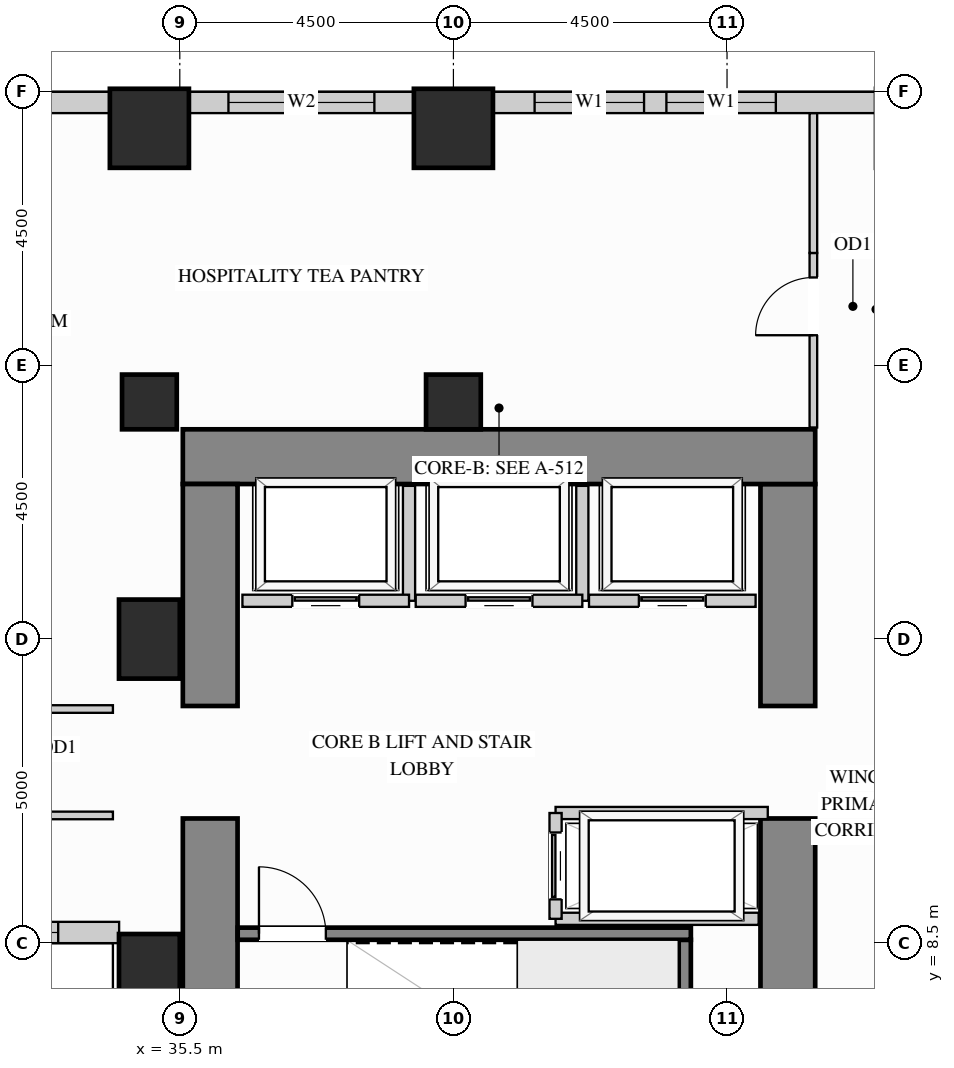
"""IFC4 building model, lengths in metres.
Left out: names, types, materials, properties, quantities, classifications, styles, units other than length and angle.
Written with IfcOpenShell. Run it as: python <this file> out.ifc"""

import sys

from ifc_helpers import new_model, si_unit, direction, frame, frame_2d, origin, origin_2d, place, context, subcontext, project, spatial, rectangle, extrude, source, transform, mapped, element, fill, save


model = new_model("IFC4")
c1 = context("Model", 3, precision=1e-05, world=origin(), true_north=direction((0.0, 1.0)))
c2 = subcontext(c1, "Body", "Model", "MODEL_VIEW")
j1 = project(units=[si_unit("LENGTHUNIT", "METRE"), si_unit("PLANEANGLEUNIT", "RADIAN")], contexts=[c1])
p1 = place(None, origin())
s1 = spatial("IfcSite", under=j1, at=p1, CompositionType="ELEMENT")
p2 = place(p1, origin())
s2 = spatial("IfcBuilding", under=s1, at=p2, CompositionType="ELEMENT")
p3 = place(p2, frame((0.0, 0.0, 62.1)))
s3 = spatial("IfcBuildingStorey", under=s2, at=p3, CompositionType="ELEMENT", Elevation=62.1)
m1 = source(origin(), c2, "Body", "SweptSolid", [
    extrude(rectangle(XDim=0.9, YDim=0.9, at=origin_2d()), origin(), (0.0, 0.0, 1.0), 3.38),
])
for number, where, z_axis, x_axis in (
    (1, (35.0, 17.4, 0.0), (0.0, 0.0, 1.0), (1.0, 0.0, 0.0)),
    (2, (40.0, 17.4, 0.0), (0.0, 0.0, 1.0), (1.0, 0.0, 0.0)),
):
    element("IfcColumn", number, at=place(p3, frame(where, z_axis=z_axis, x_axis=x_axis)), inside=s3, PredefinedType="COLUMN", context=c2, shape_type="MappedRepresentation", body=[
        mapped(m1, transform((0.0, 0.0, 0.0), x_axis=(1.0, 0.0, 0.0), y_axis=(0.0, 1.0, 0.0), z_axis=(0.0, 0.0, 1.0))),
    ])
m2 = source(origin(), c2, "Body", "SweptSolid", [
    extrude(rectangle(XDim=1.0, YDim=1.3, at=origin_2d()), origin(), (0.0, 0.0, 1.0), 3.38),
])
for number, where, z_axis, x_axis in (
    (3, (35.0, 13.5, 0.0), (0.0, 0.0, 1.0), (1.0, 0.0, 0.0)),
    (4, (35.0, 8.0, 0.0), (0.0, 0.0, 1.0), (1.0, 0.0, 0.0)),
):
    element("IfcColumn", number, at=place(p3, frame(where, z_axis=z_axis, x_axis=x_axis)), inside=s3, PredefinedType="COLUMN", context=c2, shape_type="MappedRepresentation", body=[
        mapped(m2, transform((0.0, 0.0, 0.0), x_axis=(1.0, 0.0, 0.0), y_axis=(0.0, 1.0, 0.0), z_axis=(0.0, 0.0, 1.0))),
    ])
m3 = source(origin(), c2, "Body", "SweptSolid", [
    extrude(rectangle(XDim=1.3, YDim=1.3, at=origin_2d()), origin(), (0.0, 0.0, 1.0), 3.38),
])
for number, where, z_axis, x_axis in (
    (5, (35.0, 21.9, 0.0), (0.0, 0.0, 1.0), (1.0, 0.0, 0.0)),
    (6, (40.0, 21.9, 0.0), (0.0, 0.0, 1.0), (1.0, 0.0, 0.0)),
):
    element("IfcColumn", number, at=place(p3, frame(where, z_axis=z_axis, x_axis=x_axis)), inside=s3, PredefinedType="COLUMN", context=c2, shape_type="MappedRepresentation", body=[
        mapped(m3, transform((0.0, 0.0, 0.0), x_axis=(1.0, 0.0, 0.0), y_axis=(0.0, 1.0, 0.0), z_axis=(0.0, 0.0, 1.0))),
    ])
m4 = source(origin(), c2, "Body", "SweptSolid", [
    extrude(rectangle(XDim=5.6, YDim=0.9, at=frame_2d((2.8, 0.0))), origin(), (0.0, 0.0, 1.0), 3.38),
])
p4 = place(p3, frame((45.5, 4.95, 0.0), z_axis=(0.0, 0.0, 1.0), x_axis=(0.0, 1.0, 0.0)))
e7 = element("IfcWall", 7, at=p4, inside=s3, PredefinedType="SHEAR", context=c2, shape_type="MappedRepresentation", body=[
    mapped(m4, transform((0.0, 0.0, 0.0), x_axis=(1.0, 0.0, 0.0), y_axis=(0.0, 1.0, 0.0), z_axis=(0.0, 0.0, 1.0))),
])
m5 = source(origin(), c2, "Body", "SweptSolid", [
    extrude(rectangle(XDim=3.65, YDim=0.9, at=frame_2d((1.825, 0.0))), origin(), (0.0, 0.0, 1.0), 3.38),
])
p5 = place(p3, frame((45.5, 12.4, 0.0), z_axis=(0.0, 0.0, 1.0), x_axis=(0.0, 1.0, 0.0)))
e8 = element("IfcWall", 8, at=p5, inside=s3, PredefinedType="SHEAR", context=c2, shape_type="MappedRepresentation", body=[
    mapped(m5, transform((0.0, 0.0, 0.0), x_axis=(1.0, 0.0, 0.0), y_axis=(0.0, 1.0, 0.0), z_axis=(0.0, 0.0, 1.0))),
])
m6 = source(origin(), c2, "Body", "SweptSolid", [
    extrude(rectangle(XDim=10.4, YDim=0.9, at=frame_2d((5.2, 0.0))), origin(), (0.0, 0.0, 1.0), 3.38),
])
p6 = place(p3, frame((35.55, 16.5, 0.0), z_axis=(0.0, 0.0, 1.0), x_axis=(1.0, 0.0, 0.0)))
e9 = element("IfcWall", 9, at=p6, inside=s3, PredefinedType="SHEAR", context=c2, shape_type="MappedRepresentation", body=[
    mapped(m6, transform((0.0, 0.0, 0.0), x_axis=(1.0, 0.0, 0.0), y_axis=(0.0, 1.0, 0.0), z_axis=(0.0, 0.0, 1.0))),
])
p7 = place(p3, frame((36.0, 4.95, 0.0), z_axis=(0.0, 0.0, 1.0), x_axis=(0.0, 1.0, 0.0)))
e10 = element("IfcWall", 10, at=p7, inside=s3, PredefinedType="SHEAR", context=c2, shape_type="MappedRepresentation", body=[
    mapped(m4, transform((0.0, 0.0, 0.0), x_axis=(1.0, 0.0, 0.0), y_axis=(0.0, 1.0, 0.0), z_axis=(0.0, 0.0, 1.0))),
])
p8 = place(p3, frame((36.0, 12.4, 0.0), z_axis=(0.0, 0.0, 1.0), x_axis=(0.0, 1.0, 0.0)))
e11 = element("IfcWall", 11, at=p8, inside=s3, PredefinedType="SHEAR", context=c2, shape_type="MappedRepresentation", body=[
    mapped(m5, transform((0.0, 0.0, 0.0), x_axis=(1.0, 0.0, 0.0), y_axis=(0.0, 1.0, 0.0), z_axis=(0.0, 0.0, 1.0))),
])
p9 = place(p3, frame((30.998, 8.675, 0.0), z_axis=(0.0, 0.0, 1.0), x_axis=(1.0, 0.0, 0.0)))
e12 = element("IfcWall", 12, at=p9, inside=s3, PredefinedType="SOLIDWALL", context=c2, shape_type="SweptSolid", body=[
    extrude(rectangle(XDim=3.504, YDim=0.35, at=frame_2d((1.752, 0.0))), origin(), (0.0, 0.0, 1.0), 3.365),
])
p10 = place(p9, frame((1.002, 0.0, 0.78)))
e13 = element("IfcOpeningElement", 13, at=p10, cuts=e12, PredefinedType="OPENING", context=c2, shape_type="SweptSolid", body=[
    extrude(rectangle(XDim=1.5, YDim=2.0, at=frame_2d((0.75, 1.0))), frame((0.0, 0.185, 0.0), z_axis=(0.0, -1.0, 0.0), x_axis=(1.0, 0.0, 0.0)), (0.0, 0.0, 1.0), 0.37),
])
p11 = place(p3, frame((46.952, 22.325, 0.0), z_axis=(0.0, 0.0, 1.0), x_axis=(-1.0, 0.0, 0.0)))
e14 = element("IfcWall", 14, at=p11, inside=s3, PredefinedType="SOLIDWALL", context=c2, shape_type="SweptSolid", body=[
    extrude(rectangle(XDim=6.304, YDim=0.35, at=frame_2d((3.152, 0.0))), origin(), (0.0, 0.0, 1.0), 2.51),
])
p12 = place(p11, frame((1.649, 0.0, 0.78)))
e15 = element("IfcOpeningElement", 15, at=p12, cuts=e14, PredefinedType="OPENING", context=c2, shape_type="SweptSolid", body=[
    extrude(rectangle(XDim=1.8, YDim=1.55, at=frame_2d((0.9, 0.775))), frame((0.0, 0.185, 0.0), z_axis=(0.0, -1.0, 0.0), x_axis=(1.0, 0.0, 0.0)), (0.0, 0.0, 1.0), 0.37),
])
p13 = place(p11, frame((3.817, 0.0, 0.78)))
e16 = element("IfcOpeningElement", 16, at=p13, cuts=e14, PredefinedType="OPENING", context=c2, shape_type="SweptSolid", body=[
    extrude(rectangle(XDim=1.8, YDim=1.55, at=frame_2d((0.9, 0.775))), frame((0.0, 0.185, 0.0), z_axis=(0.0, -1.0, 0.0), x_axis=(1.0, 0.0, 0.0)), (0.0, 0.0, 1.0), 0.37),
])
p14 = place(p3, frame((39.352, 22.325, 0.0), z_axis=(0.0, 0.0, 1.0), x_axis=(-1.0, 0.0, 0.0)))
e17 = element("IfcWall", 17, at=p14, inside=s3, PredefinedType="SOLIDWALL", context=c2, shape_type="SweptSolid", body=[
    extrude(rectangle(XDim=3.704, YDim=0.35, at=frame_2d((1.852, 0.0))), origin(), (0.0, 0.0, 1.0), 2.51),
])
p15 = place(p14, frame((0.652, 0.0, 0.78)))
e18 = element("IfcOpeningElement", 18, at=p15, cuts=e17, PredefinedType="OPENING", context=c2, shape_type="SweptSolid", body=[
    extrude(rectangle(XDim=2.4, YDim=1.55, at=frame_2d((1.2, 0.775))), frame((0.0, 0.185, 0.0), z_axis=(0.0, -1.0, 0.0), x_axis=(1.0, 0.0, 0.0)), (0.0, 0.0, 1.0), 0.37),
])
p16 = place(p3, frame((34.352, 22.325, 0.0), z_axis=(0.0, 0.0, 1.0), x_axis=(-1.0, 0.0, 0.0)))
e19 = element("IfcWall", 19, at=p16, inside=s3, PredefinedType="SOLIDWALL", context=c2, shape_type="SweptSolid", body=[
    extrude(rectangle(XDim=14.854, YDim=0.35, at=frame_2d((7.427, 0.0))), origin(), (0.0, 0.0, 1.0), 3.365),
])
p17 = place(p16, frame((4.058, 0.0, 0.78)))
e20 = element("IfcOpeningElement", 20, at=p17, cuts=e19, PredefinedType="OPENING", context=c2, shape_type="SweptSolid", body=[
    extrude(rectangle(XDim=1.5, YDim=2.0, at=frame_2d((0.75, 1.0))), frame((0.0, 0.185, 0.0), z_axis=(0.0, -1.0, 0.0), x_axis=(1.0, 0.0, 0.0)), (0.0, 0.0, 1.0), 0.37),
])
p18 = place(p16, frame((9.296, 0.0, 0.78)))
e21 = element("IfcOpeningElement", 21, at=p18, cuts=e19, PredefinedType="OPENING", context=c2, shape_type="SweptSolid", body=[
    extrude(rectangle(XDim=1.5, YDim=2.0, at=frame_2d((0.75, 1.0))), frame((0.0, 0.185, 0.0), z_axis=(0.0, -1.0, 0.0), x_axis=(1.0, 0.0, 0.0)), (0.0, 0.0, 1.0), 0.37),
])
p19 = place(p3, frame((45.92, 16.98, 0.0), z_axis=(0.0, 0.0, 1.0), x_axis=(0.0, 1.0, 0.0)))
e22 = element("IfcWall", 22, at=p19, inside=s3, PredefinedType="PARTITIONING", context=c2, shape_type="SweptSolid", body=[
    extrude(rectangle(XDim=2.87, YDim=0.125, at=frame_2d((1.435, 0.0))), origin(), (0.0, 0.0, 1.0), 3.365),
])
p20 = place(p19, frame((1.517, 0.0, 0.0)))
e23 = element("IfcOpeningElement", 23, at=p20, cuts=e22, PredefinedType="OPENING", context=c2, shape_type="SweptSolid", body=[
    extrude(rectangle(XDim=0.95, YDim=2.15, at=frame_2d((0.475, 1.075))), frame((0.0, 0.073, 0.0), z_axis=(0.0, -1.0, 0.0), x_axis=(1.0, 0.0, 0.0)), (0.0, 0.0, 1.0), 0.145),
])
m7 = source(origin(), c2, "Body", "SweptSolid", [
    extrude(rectangle(XDim=2.298, YDim=0.125, at=frame_2d((1.149, 0.0))), origin(), (0.0, 0.0, 1.0), 3.365),
])
p21 = place(p3, frame((45.92, 19.85, 0.0), z_axis=(0.0, 0.0, 1.0), x_axis=(0.0, 1.0, 0.0)))
e24 = element("IfcWall", 24, at=p21, inside=s3, PredefinedType="PARTITIONING", context=c2, shape_type="MappedRepresentation", body=[
    mapped(m7, transform((0.0, 0.0, 0.0), x_axis=(1.0, 0.0, 0.0), y_axis=(0.0, 1.0, 0.0), z_axis=(0.0, 0.0, 1.0))),
])
p22 = place(p3, frame((29.85, 12.35, 0.0), z_axis=(0.0, 0.0, 1.0), x_axis=(1.0, 0.0, 0.0)))
e25 = element("IfcWall", 25, at=p22, inside=s3, PredefinedType="PARTITIONING", context=c2, shape_type="SweptSolid", body=[
    extrude(rectangle(XDim=4.55, YDim=0.125, at=frame_2d((2.275, 0.0))), origin(), (0.0, 0.0, 1.0), 3.365),
])
p23 = place(p22, frame((1.8, 0.0, 0.0)))
e26 = element("IfcOpeningElement", 26, at=p23, cuts=e25, PredefinedType="OPENING", context=c2, shape_type="SweptSolid", body=[
    extrude(rectangle(XDim=0.95, YDim=2.15, at=frame_2d((0.475, 1.075))), frame((0.0, 0.073, 0.0), z_axis=(0.0, -1.0, 0.0), x_axis=(1.0, 0.0, 0.0)), (0.0, 0.0, 1.0), 0.145),
])
p24 = place(p3, frame((26.95, 10.6, 0.0), z_axis=(0.0, 0.0, 1.0), x_axis=(1.0, 0.0, 0.0)))
e27 = element("IfcWall", 27, at=p24, inside=s3, PredefinedType="PARTITIONING", context=c2, shape_type="SweptSolid", body=[
    extrude(rectangle(XDim=7.45, YDim=0.125, at=frame_2d((3.725, 0.0))), origin(), (0.0, 0.0, 1.0), 3.365),
])
p25 = place(p24, frame((4.683, 0.0, 0.0)))
e28 = element("IfcOpeningElement", 28, at=p25, cuts=e27, PredefinedType="OPENING", context=c2, shape_type="SweptSolid", body=[
    extrude(rectangle(XDim=0.95, YDim=2.15, at=frame_2d((0.475, 1.075))), frame((0.0, 0.073, 0.0), z_axis=(0.0, -1.0, 0.0), x_axis=(1.0, 0.0, 0.0)), (0.0, 0.0, 1.0), 0.145),
])
m8 = source(origin(), c2, "Body", "SweptSolid", [
    extrude(rectangle(XDim=1.89, YDim=0.2, at=frame_2d((0.945, 0.0))), origin(), (0.0, 0.0, 1.0), 3.365),
])
p26 = place(p3, frame((39.27, 14.13, 0.0), z_axis=(0.0, 0.0, 1.0), x_axis=(0.0, 1.0, 0.0)))
e29 = element("IfcWall", 29, at=p26, inside=s3, PredefinedType="PARTITIONING", context=c2, shape_type="MappedRepresentation", body=[
    mapped(m8, transform((0.0, 0.0, 0.0), x_axis=(1.0, 0.0, 0.0), y_axis=(0.0, 1.0, 0.0), z_axis=(0.0, 0.0, 1.0))),
])
p27 = place(p3, frame((36.53, 14.13, 0.0), z_axis=(0.0, 0.0, 1.0), x_axis=(1.0, 0.0, 0.0)))
e30 = element("IfcWall", 30, at=p27, inside=s3, PredefinedType="PARTITIONING", context=c2, shape_type="SweptSolid", body=[
    extrude(rectangle(XDim=2.74, YDim=0.2, at=frame_2d((1.37, 0.0))), origin(), (0.0, 0.0, 1.0), 3.365),
])
p28 = place(p27, frame((0.82, 0.0, 0.0)))
e31 = element("IfcOpeningElement", 31, at=p28, cuts=e30, PredefinedType="OPENING", context=c2, shape_type="SweptSolid", body=[
    extrude(rectangle(XDim=1.1, YDim=2.2, at=frame_2d((0.55, 1.1))), frame((0.0, 0.11, 0.0), z_axis=(0.0, -1.0, 0.0), x_axis=(1.0, 0.0, 0.0)), (0.0, 0.0, 1.0), 0.22),
])
p29 = place(p3, frame((42.12, 14.13, 0.0), z_axis=(0.0, 0.0, 1.0), x_axis=(0.0, 1.0, 0.0)))
e32 = element("IfcWall", 32, at=p29, inside=s3, PredefinedType="PARTITIONING", context=c2, shape_type="MappedRepresentation", body=[
    mapped(m8, transform((0.0, 0.0, 0.0), x_axis=(1.0, 0.0, 0.0), y_axis=(0.0, 1.0, 0.0), z_axis=(0.0, 0.0, 1.0))),
])
p30 = place(p3, frame((39.38, 14.13, 0.0), z_axis=(0.0, 0.0, 1.0), x_axis=(1.0, 0.0, 0.0)))
e33 = element("IfcWall", 33, at=p30, inside=s3, PredefinedType="PARTITIONING", context=c2, shape_type="SweptSolid", body=[
    extrude(rectangle(XDim=2.74, YDim=0.2, at=frame_2d((1.37, 0.0))), origin(), (0.0, 0.0, 1.0), 3.365),
])
p31 = place(p30, frame((0.82, 0.0, 0.0)))
e34 = element("IfcOpeningElement", 34, at=p31, cuts=e33, PredefinedType="OPENING", context=c2, shape_type="SweptSolid", body=[
    extrude(rectangle(XDim=1.1, YDim=2.2, at=frame_2d((0.55, 1.1))), frame((0.0, 0.11, 0.0), z_axis=(0.0, -1.0, 0.0), x_axis=(1.0, 0.0, 0.0)), (0.0, 0.0, 1.0), 0.22),
])
p32 = place(p3, frame((42.23, 14.13, 0.0), z_axis=(0.0, 0.0, 1.0), x_axis=(1.0, 0.0, 0.0)))
e35 = element("IfcWall", 35, at=p32, inside=s3, PredefinedType="PARTITIONING", context=c2, shape_type="SweptSolid", body=[
    extrude(rectangle(XDim=2.74, YDim=0.2, at=frame_2d((1.37, 0.0))), origin(), (0.0, 0.0, 1.0), 3.365),
])
p33 = place(p32, frame((0.82, 0.0, 0.0)))
e36 = element("IfcOpeningElement", 36, at=p33, cuts=e35, PredefinedType="OPENING", context=c2, shape_type="SweptSolid", body=[
    extrude(rectangle(XDim=1.1, YDim=2.2, at=frame_2d((0.55, 1.1))), frame((0.0, 0.11, 0.0), z_axis=(0.0, -1.0, 0.0), x_axis=(1.0, 0.0, 0.0)), (0.0, 0.0, 1.0), 0.22),
])
m9 = source(origin(), c2, "Body", "SweptSolid", [
    extrude(rectangle(XDim=3.49, YDim=0.2, at=frame_2d((1.745, 0.0))), origin(), (0.0, 0.0, 1.0), 3.365),
])
p34 = place(p3, frame((41.68, 10.64, 0.0), z_axis=(0.0, 0.0, 1.0), x_axis=(1.0, 0.0, 0.0)))
e37 = element("IfcWall", 37, at=p34, inside=s3, PredefinedType="PARTITIONING", context=c2, shape_type="MappedRepresentation", body=[
    mapped(m9, transform((0.0, 0.0, 0.0), x_axis=(1.0, 0.0, 0.0), y_axis=(0.0, 1.0, 0.0), z_axis=(0.0, 0.0, 1.0))),
])
m10 = source(origin(), c2, "Body", "SweptSolid", [
    extrude(rectangle(XDim=3.34, YDim=0.2, at=frame_2d((1.67, 0.0))), origin(), (0.0, 0.0, 1.0), 3.365),
])
p35 = place(p3, frame((41.68, 8.9, 0.0), z_axis=(0.0, 0.0, 1.0), x_axis=(1.0, 0.0, 0.0)))
e38 = element("IfcWall", 38, at=p35, inside=s3, PredefinedType="PARTITIONING", context=c2, shape_type="MappedRepresentation", body=[
    mapped(m10, transform((0.0, 0.0, 0.0), x_axis=(1.0, 0.0, 0.0), y_axis=(0.0, 1.0, 0.0), z_axis=(0.0, 0.0, 1.0))),
])
p36 = place(p3, frame((41.68, 8.9, 0.0), z_axis=(0.0, 0.0, 1.0), x_axis=(0.0, 1.0, 0.0)))
e39 = element("IfcWall", 39, at=p36, inside=s3, PredefinedType="PARTITIONING", context=c2, shape_type="SweptSolid", body=[
    extrude(rectangle(XDim=1.74, YDim=0.2, at=frame_2d((0.87, 0.0))), origin(), (0.0, 0.0, 1.0), 3.365),
])
p37 = place(p36, frame((0.32, 0.0, 0.0)))
e40 = element("IfcOpeningElement", 40, at=p37, cuts=e39, PredefinedType="OPENING", context=c2, shape_type="SweptSolid", body=[
    extrude(rectangle(XDim=1.1, YDim=2.2, at=frame_2d((0.55, 1.1))), frame((0.0, 0.11, 0.0), z_axis=(0.0, -1.0, 0.0), x_axis=(1.0, 0.0, 0.0)), (0.0, 0.0, 1.0), 0.22),
])
m11 = source(origin(), c2, "Body", "SweptSolid", [
    extrude(rectangle(XDim=3.603, YDim=0.2, at=frame_2d((1.802, 0.0))), origin(), (0.0, 0.0, 1.0), 3.38),
])
p38 = place(p3, frame((43.805, 4.952, 0.0), z_axis=(0.0, 0.0, 1.0), x_axis=(0.0, 1.0, 0.0)))
e41 = element("IfcWall", 41, at=p38, inside=s3, PredefinedType="SHEAR", context=c2, shape_type="MappedRepresentation", body=[
    mapped(m11, transform((0.0, 0.0, 0.0), x_axis=(1.0, 0.0, 0.0), y_axis=(0.0, 1.0, 0.0), z_axis=(0.0, 0.0, 1.0))),
])
p39 = place(p3, frame((36.452, 8.655, 0.0), z_axis=(0.0, 0.0, 1.0), x_axis=(1.0, 0.0, 0.0)))
e42 = element("IfcWall", 42, at=p39, inside=s3, PredefinedType="SHEAR", context=c2, shape_type="SweptSolid", body=[
    extrude(rectangle(XDim=7.453, YDim=0.2, at=frame_2d((3.727, 0.0))), origin(), (0.0, 0.0, 1.0), 3.38),
])
p40 = place(p39, frame((0.35, 0.0, 0.0)))
e43 = element("IfcOpeningElement", 43, at=p40, cuts=e42, PredefinedType="OPENING", context=c2, shape_type="SweptSolid", body=[
    extrude(rectangle(XDim=1.1, YDim=2.15, at=frame_2d((0.55, 1.075))), frame((0.0, 0.11, 0.0), z_axis=(0.0, -1.0, 0.0), x_axis=(1.0, 0.0, 0.0)), (0.0, 0.0, 1.0), 0.22),
])
m12 = source(origin(), c2, "Body", "SweptSolid", [
    extrude(rectangle(XDim=1.1, YDim=2.2, at=frame_2d((0.55, 1.1))), frame((0.0, 0.025, 0.0), z_axis=(0.0, -1.0, 0.0), x_axis=(1.0, 0.0, 0.0)), (0.0, 0.0, 1.0), 0.05),
])
p41 = place(p28, origin())
e44 = element("IfcDoor", 44, at=p41, inside=s3, OperationType="SLIDING_TO_LEFT", PredefinedType="DOOR", context=c2, shape_type="MappedRepresentation", body=[
    mapped(m12, transform((0.0, 0.0, 0.0), x_axis=(1.0, 0.0, 0.0), y_axis=(0.0, 1.0, 0.0), z_axis=(0.0, 0.0, 1.0))),
])
fill(e31, e44)
p42 = place(p31, origin())
e45 = element("IfcDoor", 45, at=p42, inside=s3, OperationType="SLIDING_TO_LEFT", PredefinedType="DOOR", context=c2, shape_type="MappedRepresentation", body=[
    mapped(m12, transform((0.0, 0.0, 0.0), x_axis=(1.0, 0.0, 0.0), y_axis=(0.0, 1.0, 0.0), z_axis=(0.0, 0.0, 1.0))),
])
fill(e34, e45)
p43 = place(p33, origin())
e46 = element("IfcDoor", 46, at=p43, inside=s3, OperationType="SLIDING_TO_LEFT", PredefinedType="DOOR", context=c2, shape_type="MappedRepresentation", body=[
    mapped(m12, transform((0.0, 0.0, 0.0), x_axis=(1.0, 0.0, 0.0), y_axis=(0.0, 1.0, 0.0), z_axis=(0.0, 0.0, 1.0))),
])
fill(e36, e46)
p44 = place(p37, origin())
e47 = element("IfcDoor", 47, at=p44, inside=s3, OperationType="SLIDING_TO_LEFT", PredefinedType="DOOR", context=c2, shape_type="MappedRepresentation", body=[
    mapped(m12, transform((0.0, 0.0, 0.0), x_axis=(1.0, 0.0, 0.0), y_axis=(0.0, 1.0, 0.0), z_axis=(0.0, 0.0, 1.0))),
])
fill(e40, e47)
m13 = source(origin(), c2, "Body", "SweptSolid", [
    extrude(rectangle(XDim=0.95, YDim=2.15, at=frame_2d((0.475, 1.075))), frame((0.0, 0.025, 0.0), z_axis=(0.0, -1.0, 0.0), x_axis=(1.0, 0.0, 0.0)), (0.0, 0.0, 1.0), 0.05),
])
p45 = place(p20, origin())
e48 = element("IfcDoor", 48, at=p45, inside=s3, OperationType="SINGLE_SWING_LEFT", PredefinedType="DOOR", context=c2, shape_type="MappedRepresentation", body=[
    mapped(m13, transform((0.0, 0.0, 0.0), x_axis=(1.0, 0.0, 0.0), y_axis=(0.0, 1.0, 0.0), z_axis=(0.0, 0.0, 1.0))),
])
fill(e23, e48)
m14 = source(origin(), c2, "Body", "SweptSolid", [
    extrude(rectangle(XDim=1.1, YDim=2.15, at=frame_2d((0.55, 1.075))), frame((0.0, 0.025, 0.0), z_axis=(0.0, -1.0, 0.0), x_axis=(1.0, 0.0, 0.0)), (0.0, 0.0, 1.0), 0.05),
])
p46 = place(p40, origin())
e49 = element("IfcDoor", 49, at=p46, inside=s3, OperationType="SINGLE_SWING_LEFT", PredefinedType="DOOR", context=c2, shape_type="MappedRepresentation", body=[
    mapped(m14, transform((0.0, 0.0, 0.0), x_axis=(1.0, 0.0, 0.0), y_axis=(0.0, 1.0, 0.0), z_axis=(0.0, 0.0, 1.0))),
])
fill(e43, e49)
m15 = source(origin(), c2, "Body", "SweptSolid", [
    extrude(rectangle(XDim=1.8, YDim=1.55, at=frame_2d((0.9, 0.775))), frame((0.0, 0.03, 0.0), z_axis=(0.0, -1.0, 0.0), x_axis=(1.0, 0.0, 0.0)), (0.0, 0.0, 1.0), 0.06),
])
p47 = place(p12, origin())
e50 = element("IfcWindow", 50, at=p47, inside=s3, PartitioningType="SINGLE_PANEL", PredefinedType="WINDOW", context=c2, shape_type="MappedRepresentation", body=[
    mapped(m15, transform((0.0, 0.0, 0.0), x_axis=(1.0, 0.0, 0.0), y_axis=(0.0, 1.0, 0.0), z_axis=(0.0, 0.0, 1.0))),
])
fill(e15, e50)
p48 = place(p13, origin())
e51 = element("IfcWindow", 51, at=p48, inside=s3, PartitioningType="SINGLE_PANEL", PredefinedType="WINDOW", context=c2, shape_type="MappedRepresentation", body=[
    mapped(m15, transform((0.0, 0.0, 0.0), x_axis=(1.0, 0.0, 0.0), y_axis=(0.0, 1.0, 0.0), z_axis=(0.0, 0.0, 1.0))),
])
fill(e16, e51)
m16 = source(origin(), c2, "Body", "SweptSolid", [
    extrude(rectangle(XDim=2.4, YDim=1.55, at=frame_2d((1.2, 0.775))), frame((0.0, 0.03, 0.0), z_axis=(0.0, -1.0, 0.0), x_axis=(1.0, 0.0, 0.0)), (0.0, 0.0, 1.0), 0.06),
])
p49 = place(p15, origin())
e52 = element("IfcWindow", 52, at=p49, inside=s3, PartitioningType="SINGLE_PANEL", PredefinedType="WINDOW", context=c2, shape_type="MappedRepresentation", body=[
    mapped(m16, transform((0.0, 0.0, 0.0), x_axis=(1.0, 0.0, 0.0), y_axis=(0.0, 1.0, 0.0), z_axis=(0.0, 0.0, 1.0))),
])
fill(e18, e52)
m17 = source(origin(), c2, "Body", "SweptSolid", [
    extrude(rectangle(XDim=1.5, YDim=2.0, at=frame_2d((0.75, 1.0))), frame((0.0, 0.03, 0.0), z_axis=(0.0, -1.0, 0.0), x_axis=(1.0, 0.0, 0.0)), (0.0, 0.0, 1.0), 0.06),
])
p50 = place(p10, origin())
e53 = element("IfcWindow", 53, at=p50, inside=s3, PartitioningType="SINGLE_PANEL", PredefinedType="WINDOW", context=c2, shape_type="MappedRepresentation", body=[
    mapped(m17, transform((0.0, 0.0, 0.0), x_axis=(1.0, 0.0, 0.0), y_axis=(0.0, 1.0, 0.0), z_axis=(0.0, 0.0, 1.0))),
])
fill(e13, e53)
save(model, sys.argv[1])
